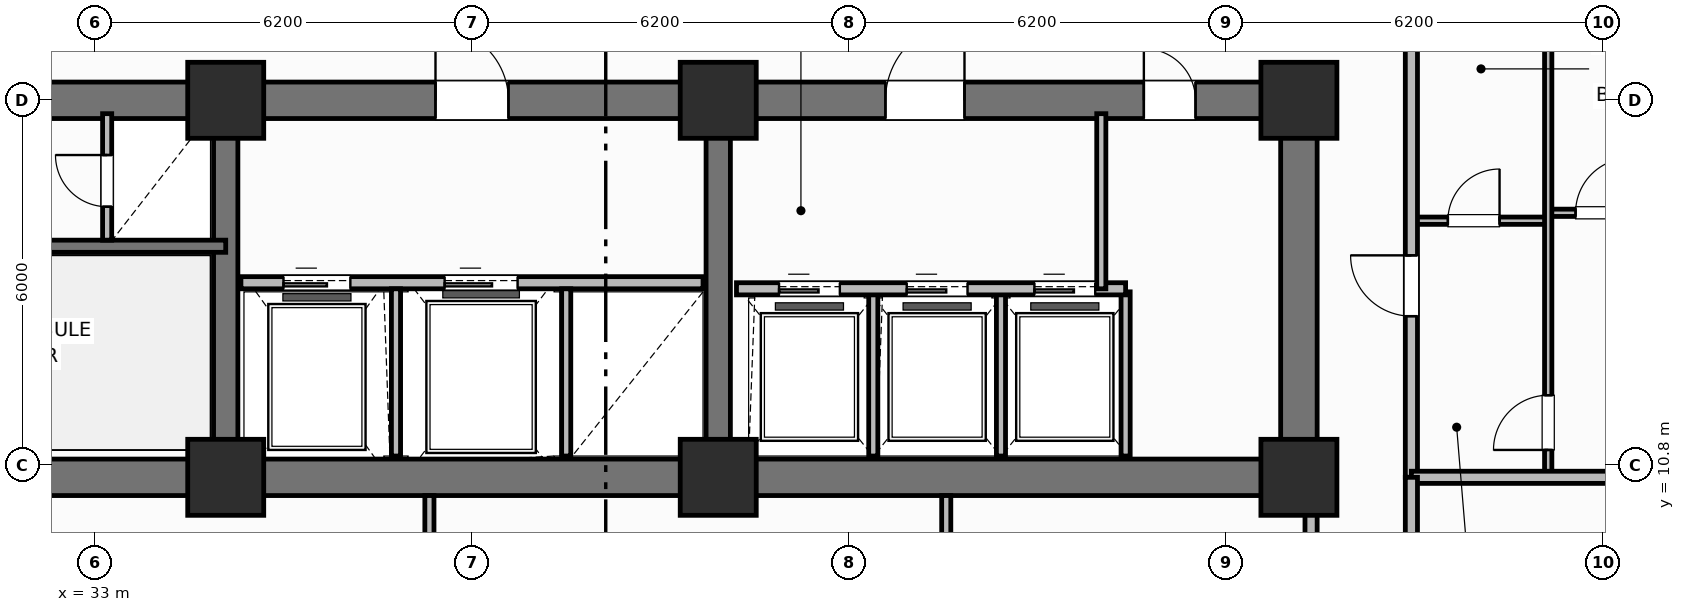
"""IFC4 building model, lengths in metres.
Left out: names, types, materials, properties, quantities, classifications, styles, units other than length and angle.
Written with IfcOpenShell. Run it as: python <this file> out.ifc"""

import sys

from ifc_helpers import new_model, si_unit, direction, frame, frame_2d, origin, origin_2d, place, context, subcontext, project, spatial, rectangle, extrude, element, fill, save


model = new_model("IFC4")
c1 = context("Model", 3, precision=1e-05, world=origin(), true_north=direction((0.0, 1.0)))
c2 = subcontext(c1, "Body", "Model", "MODEL_VIEW")
j1 = project(units=[si_unit("LENGTHUNIT", "METRE"), si_unit("PLANEANGLEUNIT", "RADIAN")], contexts=[c1])
p1 = place(None, origin())
s1 = spatial("IfcSite", under=j1, at=p1, CompositionType="ELEMENT")
p2 = place(p1, origin())
s2 = spatial("IfcBuilding", under=s1, at=p2, CompositionType="ELEMENT")
p3 = place(p2, frame((0.0, 0.0, 65.8)))
s3 = spatial("IfcBuildingStorey", under=s2, at=p3, CompositionType="ELEMENT", Elevation=65.8)
p4 = place(p3, frame((52.8, 10.6, 0.0), z_axis=(0.0, 0.0, 1.0), x_axis=(-1.0, 0.0, 0.0)))
e1 = element("IfcWall", 1, at=p4, inside=s3, PredefinedType="SHEAR", context=c2, shape_type="SweptSolid", body=[
    extrude(rectangle(XDim=27.2, YDim=0.6, at=frame_2d((13.6, 0.0))), origin(), (0.0, 0.0, 1.0), 3.7),
])
p5 = place(p3, frame((52.8, 10.9, 0.0), z_axis=(0.0, 0.0, 1.0), x_axis=(0.0, 1.0, 0.0)))
e2 = element("IfcWall", 2, at=p5, inside=s3, PredefinedType="SHEAR", context=c2, shape_type="SweptSolid", body=[
    extrude(rectangle(XDim=5.6, YDim=0.6, at=frame_2d((2.8, 0.0))), origin(), (0.0, 0.0, 1.0), 3.7),
])
p6 = place(p3, frame((25.6, 16.8, 0.0), z_axis=(0.0, 0.0, 1.0), x_axis=(1.0, 0.0, 0.0)))
e3 = element("IfcWall", 3, at=p6, inside=s3, PredefinedType="SHEAR", context=c2, shape_type="SweptSolid", body=[
    extrude(rectangle(XDim=27.2, YDim=0.6, at=frame_2d((13.6, 0.0))), origin(), (0.0, 0.0, 1.0), 3.7),
])
p7 = place(p6, frame((1.9, 0.0, 0.0)))
e4 = element("IfcOpeningElement", 4, at=p7, cuts=e3, PredefinedType="OPENING", context=c2, shape_type="SweptSolid", body=[
    extrude(rectangle(XDim=1.1, YDim=2.15, at=frame_2d((0.55, 1.075))), frame((0.0, 0.31, 0.0), z_axis=(0.0, -1.0, 0.0), x_axis=(1.0, 0.0, 0.0)), (0.0, 0.0, 1.0), 0.62),
])
p8 = place(p6, frame((13.0, 0.0, 0.0)))
e5 = element("IfcOpeningElement", 5, at=p8, cuts=e3, PredefinedType="OPENING", context=c2, shape_type="SweptSolid", body=[
    extrude(rectangle(XDim=1.2, YDim=2.15, at=frame_2d((0.6, 1.075))), frame((0.0, 0.31, 0.0), z_axis=(0.0, -1.0, 0.0), x_axis=(1.0, 0.0, 0.0)), (0.0, 0.0, 1.0), 0.62),
])
p9 = place(p6, frame((20.4, 0.0, 0.0)))
e6 = element("IfcOpeningElement", 6, at=p9, cuts=e3, PredefinedType="OPENING", context=c2, shape_type="SweptSolid", body=[
    extrude(rectangle(XDim=1.3, YDim=2.2, at=frame_2d((0.65, 1.1))), frame((0.0, 0.31, 0.0), z_axis=(0.0, -1.0, 0.0), x_axis=(1.0, 0.0, 0.0)), (0.0, 0.0, 1.0), 0.62),
])
p10 = place(p6, frame((24.65, 0.0, 0.0)))
e7 = element("IfcOpeningElement", 7, at=p10, cuts=e3, PredefinedType="OPENING", context=c2, shape_type="SweptSolid", body=[
    extrude(rectangle(XDim=0.85, YDim=2.1, at=frame_2d((0.425, 1.05))), frame((0.0, 0.31, 0.0), z_axis=(0.0, -1.0, 0.0), x_axis=(1.0, 0.0, 0.0)), (0.0, 0.0, 1.0), 0.62),
])
for number, where, z_axis, x_axis in (
    (8, (35.15, 10.9, 0.0), (0.0, 0.0, 1.0), (0.0, 1.0, 0.0)),
    (9, (43.25, 10.9, 0.0), (0.0, 0.0, 1.0), (0.0, 1.0, 0.0)),
):
    element("IfcWall", number, at=place(p3, frame(where, z_axis=z_axis, x_axis=x_axis)), inside=s3, PredefinedType="SHEAR", context=c2, shape_type="SweptSolid", body=[
        extrude(rectangle(XDim=5.6, YDim=0.4, at=frame_2d((2.8, 0.0))), origin(), (0.0, 0.0, 1.0), 3.7),
    ])
for number, where, z_axis, x_axis in (
    (10, (35.15, 10.6, 0.0), (0.0, 0.0, 1.0), (1.0, 0.0, 0.0)),
    (11, (35.15, 16.8, 0.0), (0.0, 0.0, 1.0), (1.0, 0.0, 0.0)),
    (12, (43.25, 10.6, 0.0), (0.0, 0.0, 1.0), (1.0, 0.0, 0.0)),
    (13, (43.25, 16.8, 0.0), (0.0, 0.0, 1.0), (1.0, 0.0, 0.0)),
    (14, (52.8, 10.6, 0.0), (0.0, 0.0, 1.0), (1.0, 0.0, 0.0)),
    (15, (52.8, 16.8, 0.0), (0.0, 0.0, 1.0), (1.0, 0.0, 0.0)),
):
    element("IfcColumn", number, at=place(p3, frame(where, z_axis=z_axis, x_axis=x_axis)), inside=s3, PredefinedType="COLUMN", context=c2, shape_type="SweptSolid", body=[
        extrude(rectangle(XDim=1.25, YDim=1.25, at=origin_2d()), origin(), (0.0, 0.0, 1.0), 3.7),
    ])
p11 = place(p3, frame((25.6, 14.4, 0.0), z_axis=(0.0, 0.0, 1.0), x_axis=(1.0, 0.0, 0.0)))
e16 = element("IfcWall", 16, at=p11, inside=s3, PredefinedType="SHEAR", context=c2, shape_type="SweptSolid", body=[
    extrude(rectangle(XDim=9.55, YDim=0.2, at=frame_2d((4.775, 0.0))), origin(), (0.0, 0.0, 1.0), 3.7),
])
p12 = place(p11, frame((1.05, 0.0, 0.0)))
e17 = element("IfcOpeningElement", 17, at=p12, cuts=e16, PredefinedType="OPENING", context=c2, shape_type="SweptSolid", body=[
    extrude(rectangle(XDim=1.1, YDim=2.15, at=frame_2d((0.55, 1.075))), frame((0.0, 0.11, 0.0), z_axis=(0.0, -1.0, 0.0), x_axis=(1.0, 0.0, 0.0)), (0.0, 0.0, 1.0), 0.22),
])
p13 = place(p3, frame((33.2, 14.5, 0.0), z_axis=(0.0, 0.0, 1.0), x_axis=(0.0, 1.0, 0.0)))
e18 = element("IfcWall", 18, at=p13, inside=s3, PredefinedType="PARTITIONING", context=c2, shape_type="SweptSolid", body=[
    extrude(rectangle(XDim=2.08, YDim=0.15, at=frame_2d((1.04, 0.0))), origin(), (0.0, 0.0, 1.0), 2.53),
])
p14 = place(p13, frame((0.55, 0.0, 0.0)))
e19 = element("IfcOpeningElement", 19, at=p14, cuts=e18, PredefinedType="OPENING", context=c2, shape_type="SweptSolid", body=[
    extrude(rectangle(XDim=0.85, YDim=2.05, at=frame_2d((0.425, 1.025))), frame((0.0, 0.085, 0.0), z_axis=(0.0, -1.0, 0.0), x_axis=(1.0, 0.0, 0.0)), (0.0, 0.0, 1.0), 0.17),
])
p15 = place(p3, frame((35.4, 13.8, 0.0), z_axis=(0.0, 0.0, 1.0), x_axis=(1.0, 0.0, 0.0)))
e20 = element("IfcWall", 20, at=p15, inside=s3, PredefinedType="PARTITIONING", context=c2, shape_type="SweptSolid", body=[
    extrude(rectangle(XDim=7.6, YDim=0.2, at=frame_2d((3.8, 0.0))), origin(), (0.0, 0.0, 1.0), 2.3),
])
p16 = place(p15, frame((0.7, 0.0, 0.0)))
e21 = element("IfcOpeningElement", 21, at=p16, cuts=e20, PredefinedType="OPENING", context=c2, shape_type="SweptSolid", body=[
    extrude(rectangle(XDim=1.1, YDim=2.15, at=frame_2d((0.55, 1.075))), frame((0.0, 0.11, 0.0), z_axis=(0.0, -1.0, 0.0), x_axis=(1.0, 0.0, 0.0)), (0.0, 0.0, 1.0), 0.22),
])
p17 = place(p15, frame((3.35, 0.0, 0.0)))
e22 = element("IfcOpeningElement", 22, at=p17, cuts=e20, PredefinedType="OPENING", context=c2, shape_type="SweptSolid", body=[
    extrude(rectangle(XDim=1.2, YDim=2.15, at=frame_2d((0.6, 1.075))), frame((0.0, 0.11, 0.0), z_axis=(0.0, -1.0, 0.0), x_axis=(1.0, 0.0, 0.0)), (0.0, 0.0, 1.0), 0.22),
])
for number, where, z_axis, x_axis in (
    (23, (37.95, 10.95, 0.0), (0.0, 0.0, 1.0), (0.0, 1.0, 0.0)),
    (24, (40.75, 10.95, 0.0), (0.0, 0.0, 1.0), (0.0, 1.0, 0.0)),
):
    element("IfcWall", number, at=place(p3, frame(where, z_axis=z_axis, x_axis=x_axis)), inside=s3, PredefinedType="PARTITIONING", context=c2, shape_type="SweptSolid", body=[
        extrude(rectangle(XDim=2.75, YDim=0.15, at=frame_2d((1.375, 0.0))), origin(), (0.0, 0.0, 1.0), 2.53),
    ])
for number, where, z_axis, x_axis in (
    (25, (45.8, 10.95, 0.0), (0.0, 0.0, 1.0), (0.0, 1.0, 0.0)),
    (26, (47.9, 10.95, 0.0), (0.0, 0.0, 1.0), (0.0, 1.0, 0.0)),
    (27, (49.95, 10.95, 0.0), (0.0, 0.0, 1.0), (0.0, 1.0, 0.0)),
):
    element("IfcWall", number, at=place(p3, frame(where, z_axis=z_axis, x_axis=x_axis)), inside=s3, PredefinedType="PARTITIONING", context=c2, shape_type="SweptSolid", body=[
        extrude(rectangle(XDim=2.7, YDim=0.15, at=frame_2d((1.35, 0.0))), origin(), (0.0, 0.0, 1.0), 2.53),
    ])
p18 = place(p3, frame((43.55, 13.7, 0.0), z_axis=(0.0, 0.0, 1.0), x_axis=(1.0, 0.0, 0.0)))
e28 = element("IfcWall", 28, at=p18, inside=s3, PredefinedType="PARTITIONING", context=c2, shape_type="SweptSolid", body=[
    extrude(rectangle(XDim=6.4, YDim=0.2, at=frame_2d((3.2, 0.0))), origin(), (0.0, 0.0, 1.0), 2.53),
])
p19 = place(p18, frame((0.7, 0.0, 0.0)))
e29 = element("IfcOpeningElement", 29, at=p19, cuts=e28, PredefinedType="OPENING", context=c2, shape_type="SweptSolid", body=[
    extrude(rectangle(XDim=1.0, YDim=2.15, at=frame_2d((0.5, 1.075))), frame((0.0, 0.11, 0.0), z_axis=(0.0, -1.0, 0.0), x_axis=(1.0, 0.0, 0.0)), (0.0, 0.0, 1.0), 0.22),
])
p20 = place(p18, frame((2.8, 0.0, 0.0)))
e30 = element("IfcOpeningElement", 30, at=p20, cuts=e28, PredefinedType="OPENING", context=c2, shape_type="SweptSolid", body=[
    extrude(rectangle(XDim=1.0, YDim=2.15, at=frame_2d((0.5, 1.075))), frame((0.0, 0.11, 0.0), z_axis=(0.0, -1.0, 0.0), x_axis=(1.0, 0.0, 0.0)), (0.0, 0.0, 1.0), 0.22),
])
p21 = place(p18, frame((4.9, 0.0, 0.0)))
e31 = element("IfcOpeningElement", 31, at=p21, cuts=e28, PredefinedType="OPENING", context=c2, shape_type="SweptSolid", body=[
    extrude(rectangle(XDim=1.0, YDim=2.15, at=frame_2d((0.5, 1.075))), frame((0.0, 0.11, 0.0), z_axis=(0.0, -1.0, 0.0), x_axis=(1.0, 0.0, 0.0)), (0.0, 0.0, 1.0), 0.22),
])
p22 = place(p3, frame((49.55, 13.7, 0.0), z_axis=(0.0, 0.0, 1.0), x_axis=(0.0, 1.0, 0.0)))
e32 = element("IfcWall", 32, at=p22, inside=s3, PredefinedType="PARTITIONING", context=c2, shape_type="SweptSolid", body=[
    extrude(rectangle(XDim=2.88, YDim=0.15, at=frame_2d((1.44, 0.0))), origin(), (0.0, 0.0, 1.0), 2.53),
])
p23 = place(p3, frame((54.65, 14.82, 0.0), z_axis=(0.0, 0.0, 1.0), x_axis=(1.0, 0.0, 0.0)))
e33 = element("IfcWall", 33, at=p23, inside=s3, PredefinedType="PARTITIONING", context=c2, shape_type="SweptSolid", body=[
    extrude(rectangle(XDim=2.25, YDim=0.12, at=frame_2d((1.125, 0.0))), origin(), (0.0, 0.0, 1.0), 2.53),
])
p24 = place(p23, frame((0.6, 0.0, 0.0)))
e34 = element("IfcOpeningElement", 34, at=p24, cuts=e33, PredefinedType="OPENING", context=c2, shape_type="SweptSolid", body=[
    extrude(rectangle(XDim=0.85, YDim=2.1, at=frame_2d((0.425, 1.05))), frame((0.0, 0.07, 0.0), z_axis=(0.0, -1.0, 0.0), x_axis=(1.0, 0.0, 0.0)), (0.0, 0.0, 1.0), 0.14),
])
p25 = place(p3, frame((56.9, 14.95, 0.0), z_axis=(0.0, 0.0, 1.0), x_axis=(1.0, 0.0, 0.0)))
e35 = element("IfcWall", 35, at=p25, inside=s3, PredefinedType="PARTITIONING", context=c2, shape_type="SweptSolid", body=[
    extrude(rectangle(XDim=6.93, YDim=0.12, at=frame_2d((3.465, 0.0))), origin(), (0.0, 0.0, 1.0), 2.53),
])
p26 = place(p25, frame((0.45, 0.0, 0.0)))
e36 = element("IfcOpeningElement", 36, at=p26, cuts=e35, PredefinedType="OPENING", context=c2, shape_type="SweptSolid", body=[
    extrude(rectangle(XDim=0.9, YDim=2.1, at=frame_2d((0.45, 1.05))), frame((0.0, 0.07, 0.0), z_axis=(0.0, -1.0, 0.0), x_axis=(1.0, 0.0, 0.0)), (0.0, 0.0, 1.0), 0.14),
])
p27 = place(p3, frame((56.9, 10.64, 0.0), z_axis=(0.0, 0.0, 1.0), x_axis=(0.0, 1.0, 0.0)))
e37 = element("IfcWall", 37, at=p27, inside=s3, PredefinedType="PARTITIONING", context=c2, shape_type="SweptSolid", body=[
    extrude(rectangle(XDim=8.72, YDim=0.12, at=frame_2d((4.36, 0.0))), origin(), (0.0, 0.0, 1.0), 2.53),
])
p28 = place(p27, frame((0.41, 0.0, 0.0)))
e38 = element("IfcOpeningElement", 38, at=p28, cuts=e37, PredefinedType="OPENING", context=c2, shape_type="SweptSolid", body=[
    extrude(rectangle(XDim=0.9, YDim=2.1, at=frame_2d((0.45, 1.05))), frame((0.0, 0.07, 0.0), z_axis=(0.0, -1.0, 0.0), x_axis=(1.0, 0.0, 0.0)), (0.0, 0.0, 1.0), 0.14),
])
p29 = place(p3, frame((54.65, 10.6, 0.0), z_axis=(0.0, 0.0, 1.0), x_axis=(0.0, 1.0, 0.0)))
e39 = element("IfcWall", 39, at=p29, inside=s3, PredefinedType="PARTITIONING", context=c2, shape_type="SweptSolid", body=[
    extrude(rectangle(XDim=35.2, YDim=0.2, at=frame_2d((17.6, 0.0))), origin(), (0.0, 0.0, 1.0), 2.53),
])
p30 = place(p29, frame((2.65, 0.0, 0.0)))
e40 = element("IfcOpeningElement", 40, at=p30, cuts=e39, PredefinedType="OPENING", context=c2, shape_type="SweptSolid", body=[
    extrude(rectangle(XDim=1.0, YDim=2.15, at=frame_2d((0.5, 1.075))), frame((0.0, 0.11, 0.0), z_axis=(0.0, -1.0, 0.0), x_axis=(1.0, 0.0, 0.0)), (0.0, 0.0, 1.0), 0.22),
])
p31 = place(p29, frame((10.81, 0.0, 0.0)))
e41 = element("IfcOpeningElement", 41, at=p31, cuts=e39, PredefinedType="OPENING", context=c2, shape_type="SweptSolid", body=[
    extrude(rectangle(XDim=1.0, YDim=2.15, at=frame_2d((0.5, 1.075))), frame((0.0, 0.11, 0.0), z_axis=(0.0, -1.0, 0.0), x_axis=(1.0, 0.0, 0.0)), (0.0, 0.0, 1.0), 0.22),
])
p32 = place(p29, frame((19.54, 0.0, 0.0)))
e42 = element("IfcOpeningElement", 42, at=p32, cuts=e39, PredefinedType="OPENING", context=c2, shape_type="SweptSolid", body=[
    extrude(rectangle(XDim=1.0, YDim=2.15, at=frame_2d((0.5, 1.075))), frame((0.0, 0.11, 0.0), z_axis=(0.0, -1.0, 0.0), x_axis=(1.0, 0.0, 0.0)), (0.0, 0.0, 1.0), 0.22),
])
p33 = place(p29, frame((26.95, 0.0, 0.0)))
e43 = element("IfcOpeningElement", 43, at=p33, cuts=e39, PredefinedType="OPENING", context=c2, shape_type="SweptSolid", body=[
    extrude(rectangle(XDim=1.0, YDim=2.15, at=frame_2d((0.5, 1.075))), frame((0.0, 0.11, 0.0), z_axis=(0.0, -1.0, 0.0), x_axis=(1.0, 0.0, 0.0)), (0.0, 0.0, 1.0), 0.22),
])
p34 = place(p3, frame((54.65, 10.6, 0.0), z_axis=(0.0, 0.0, 1.0), x_axis=(1.0, 0.0, 0.0)))
e44 = element("IfcWall", 44, at=p34, inside=s3, PredefinedType="PARTITIONING", context=c2, shape_type="SweptSolid", body=[
    extrude(rectangle(XDim=8.76, YDim=0.2, at=frame_2d((4.38, 0.0))), origin(), (0.0, 0.0, 1.0), 2.53),
])
p35 = place(p3, frame((54.65, 4.97, 0.0), z_axis=(0.0, 0.0, 1.0), x_axis=(0.0, 1.0, 0.0)))
e45 = element("IfcWall", 45, at=p35, inside=s3, PredefinedType="PARTITIONING", context=c2, shape_type="SweptSolid", body=[
    extrude(rectangle(XDim=5.63, YDim=0.2, at=frame_2d((2.815, 0.0))), origin(), (0.0, 0.0, 1.0), 2.53),
])
p36 = place(p3, frame((38.5, 4.97, 0.0), z_axis=(0.0, 0.0, 1.0), x_axis=(0.0, 1.0, 0.0)))
e46 = element("IfcWall", 46, at=p36, inside=s3, PredefinedType="PARTITIONING", context=c2, shape_type="SweptSolid", body=[
    extrude(rectangle(XDim=5.33, YDim=0.15, at=frame_2d((2.665, 0.0))), origin(), (0.0, 0.0, 1.0), 2.53),
])
p37 = place(p3, frame((47.0, 4.97, 0.0), z_axis=(0.0, 0.0, 1.0), x_axis=(0.0, 1.0, 0.0)))
e47 = element("IfcWall", 47, at=p37, inside=s3, PredefinedType="PARTITIONING", context=c2, shape_type="SweptSolid", body=[
    extrude(rectangle(XDim=5.33, YDim=0.15, at=frame_2d((2.665, 0.0))), origin(), (0.0, 0.0, 1.0), 2.53),
])
p38 = place(p37, frame((1.4, 0.0, 0.0)))
e48 = element("IfcOpeningElement", 48, at=p38, cuts=e47, PredefinedType="OPENING", context=c2, shape_type="SweptSolid", body=[
    extrude(rectangle(XDim=0.9, YDim=2.1, at=frame_2d((0.45, 1.05))), frame((0.0, 0.085, 0.0), z_axis=(0.0, -1.0, 0.0), x_axis=(1.0, 0.0, 0.0)), (0.0, 0.0, 1.0), 0.17),
])
p39 = place(p3, frame((53.0, 5.72, 0.0), z_axis=(0.0, 0.0, 1.0), x_axis=(0.0, 1.0, 0.0)))
e49 = element("IfcWall", 49, at=p39, inside=s3, PredefinedType="PARTITIONING", context=c2, shape_type="SweptSolid", body=[
    extrude(rectangle(XDim=4.58, YDim=0.2, at=frame_2d((2.29, 0.0))), origin(), (0.0, 0.0, 1.0), 2.53),
])
p40 = place(p39, frame((1.05, 0.0, 0.0)))
e50 = element("IfcOpeningElement", 50, at=p40, cuts=e49, PredefinedType="OPENING", context=c2, shape_type="SweptSolid", body=[
    extrude(rectangle(XDim=0.9, YDim=2.1, at=frame_2d((0.45, 1.05))), frame((0.0, 0.11, 0.0), z_axis=(0.0, -1.0, 0.0), x_axis=(1.0, 0.0, 0.0)), (0.0, 0.0, 1.0), 0.22),
])
p41 = place(p14, origin())
e51 = element("IfcDoor", 51, at=p41, inside=s3, OperationType="SINGLE_SWING_RIGHT", PredefinedType="TRAPDOOR", context=c2, shape_type="SweptSolid", body=[
    extrude(rectangle(XDim=0.85, YDim=2.05, at=frame_2d((0.425, 1.025))), frame((0.0, 0.025, 0.0), z_axis=(0.0, -1.0, 0.0), x_axis=(1.0, 0.0, 0.0)), (0.0, 0.0, 1.0), 0.05),
])
fill(e19, e51)
p42 = place(p16, origin())
e52 = element("IfcDoor", 52, at=p42, inside=s3, OperationType="SLIDING_TO_LEFT", PredefinedType="DOOR", context=c2, shape_type="SweptSolid", body=[
    extrude(rectangle(XDim=1.1, YDim=2.15, at=frame_2d((0.55, 1.075))), frame((0.0, 0.025, 0.0), z_axis=(0.0, -1.0, 0.0), x_axis=(1.0, 0.0, 0.0)), (0.0, 0.0, 1.0), 0.05),
])
fill(e21, e52)
p43 = place(p17, origin())
e53 = element("IfcDoor", 53, at=p43, inside=s3, OperationType="SLIDING_TO_LEFT", PredefinedType="DOOR", context=c2, shape_type="SweptSolid", body=[
    extrude(rectangle(XDim=1.2, YDim=2.15, at=frame_2d((0.6, 1.075))), frame((0.0, 0.025, 0.0), z_axis=(0.0, -1.0, 0.0), x_axis=(1.0, 0.0, 0.0)), (0.0, 0.0, 1.0), 0.05),
])
fill(e22, e53)
p44 = place(p19, origin())
e54 = element("IfcDoor", 54, at=p44, inside=s3, OperationType="SLIDING_TO_LEFT", PredefinedType="DOOR", context=c2, shape_type="SweptSolid", body=[
    extrude(rectangle(XDim=1.0, YDim=2.15, at=frame_2d((0.5, 1.075))), frame((0.0, 0.025, 0.0), z_axis=(0.0, -1.0, 0.0), x_axis=(1.0, 0.0, 0.0)), (0.0, 0.0, 1.0), 0.05),
])
fill(e29, e54)
p45 = place(p20, origin())
e55 = element("IfcDoor", 55, at=p45, inside=s3, OperationType="SLIDING_TO_LEFT", PredefinedType="DOOR", context=c2, shape_type="SweptSolid", body=[
    extrude(rectangle(XDim=1.0, YDim=2.15, at=frame_2d((0.5, 1.075))), frame((0.0, 0.025, 0.0), z_axis=(0.0, -1.0, 0.0), x_axis=(1.0, 0.0, 0.0)), (0.0, 0.0, 1.0), 0.05),
])
fill(e30, e55)
p46 = place(p21, origin())
e56 = element("IfcDoor", 56, at=p46, inside=s3, OperationType="SLIDING_TO_LEFT", PredefinedType="DOOR", context=c2, shape_type="SweptSolid", body=[
    extrude(rectangle(XDim=1.0, YDim=2.15, at=frame_2d((0.5, 1.075))), frame((0.0, 0.025, 0.0), z_axis=(0.0, -1.0, 0.0), x_axis=(1.0, 0.0, 0.0)), (0.0, 0.0, 1.0), 0.05),
])
fill(e31, e56)
p47 = place(p24, origin())
e57 = element("IfcDoor", 57, at=p47, inside=s3, OperationType="SINGLE_SWING_RIGHT", PredefinedType="DOOR", context=c2, shape_type="SweptSolid", body=[
    extrude(rectangle(XDim=0.85, YDim=2.1, at=frame_2d((0.425, 1.05))), frame((0.0, 0.025, 0.0), z_axis=(0.0, -1.0, 0.0), x_axis=(1.0, 0.0, 0.0)), (0.0, 0.0, 1.0), 0.05),
])
fill(e34, e57)
p48 = place(p26, origin())
e58 = element("IfcDoor", 58, at=p48, inside=s3, OperationType="SINGLE_SWING_RIGHT", PredefinedType="DOOR", context=c2, shape_type="SweptSolid", body=[
    extrude(rectangle(XDim=0.9, YDim=2.1, at=frame_2d((0.45, 1.05))), frame((0.0, 0.025, 0.0), z_axis=(0.0, -1.0, 0.0), x_axis=(1.0, 0.0, 0.0)), (0.0, 0.0, 1.0), 0.05),
])
fill(e36, e58)
p49 = place(p28, origin())
e59 = element("IfcDoor", 59, at=p49, inside=s3, OperationType="SINGLE_SWING_LEFT", PredefinedType="DOOR", context=c2, shape_type="SweptSolid", body=[
    extrude(rectangle(XDim=0.9, YDim=2.1, at=frame_2d((0.45, 1.05))), frame((0.0, 0.025, 0.0), z_axis=(0.0, -1.0, 0.0), x_axis=(1.0, 0.0, 0.0)), (0.0, 0.0, 1.0), 0.05),
])
fill(e38, e59)
p50 = place(p30, origin())
e60 = element("IfcDoor", 60, at=p50, inside=s3, OperationType="SINGLE_SWING_RIGHT", PredefinedType="DOOR", context=c2, shape_type="SweptSolid", body=[
    extrude(rectangle(XDim=1.0, YDim=2.15, at=frame_2d((0.5, 1.075))), frame((0.0, 0.025, 0.0), z_axis=(0.0, -1.0, 0.0), x_axis=(1.0, 0.0, 0.0)), (0.0, 0.0, 1.0), 0.05),
])
fill(e40, e60)
p51 = place(p8, origin())
e61 = element("IfcDoor", 61, at=p51, inside=s3, OperationType="SINGLE_SWING_LEFT", PredefinedType="DOOR", context=c2, shape_type="SweptSolid", body=[
    extrude(rectangle(XDim=1.2, YDim=2.15, at=frame_2d((0.6, 1.075))), frame((0.0, 0.025, 0.0), z_axis=(0.0, -1.0, 0.0), x_axis=(1.0, 0.0, 0.0)), (0.0, 0.0, 1.0), 0.05),
])
fill(e5, e61)
p52 = place(p9, origin())
e62 = element("IfcDoor", 62, at=p52, inside=s3, OperationType="SINGLE_SWING_RIGHT", PredefinedType="DOOR", context=c2, shape_type="SweptSolid", body=[
    extrude(rectangle(XDim=1.3, YDim=2.2, at=frame_2d((0.65, 1.1))), frame((0.0, 0.025, 0.0), z_axis=(0.0, -1.0, 0.0), x_axis=(1.0, 0.0, 0.0)), (0.0, 0.0, 1.0), 0.05),
])
fill(e6, e62)
p53 = place(p10, origin())
e63 = element("IfcDoor", 63, at=p53, inside=s3, OperationType="SINGLE_SWING_LEFT", PredefinedType="DOOR", context=c2, shape_type="SweptSolid", body=[
    extrude(rectangle(XDim=0.85, YDim=2.1, at=frame_2d((0.425, 1.05))), frame((0.0, 0.025, 0.0), z_axis=(0.0, -1.0, 0.0), x_axis=(1.0, 0.0, 0.0)), (0.0, 0.0, 1.0), 0.05),
])
fill(e7, e63)
save(model, sys.argv[1])
